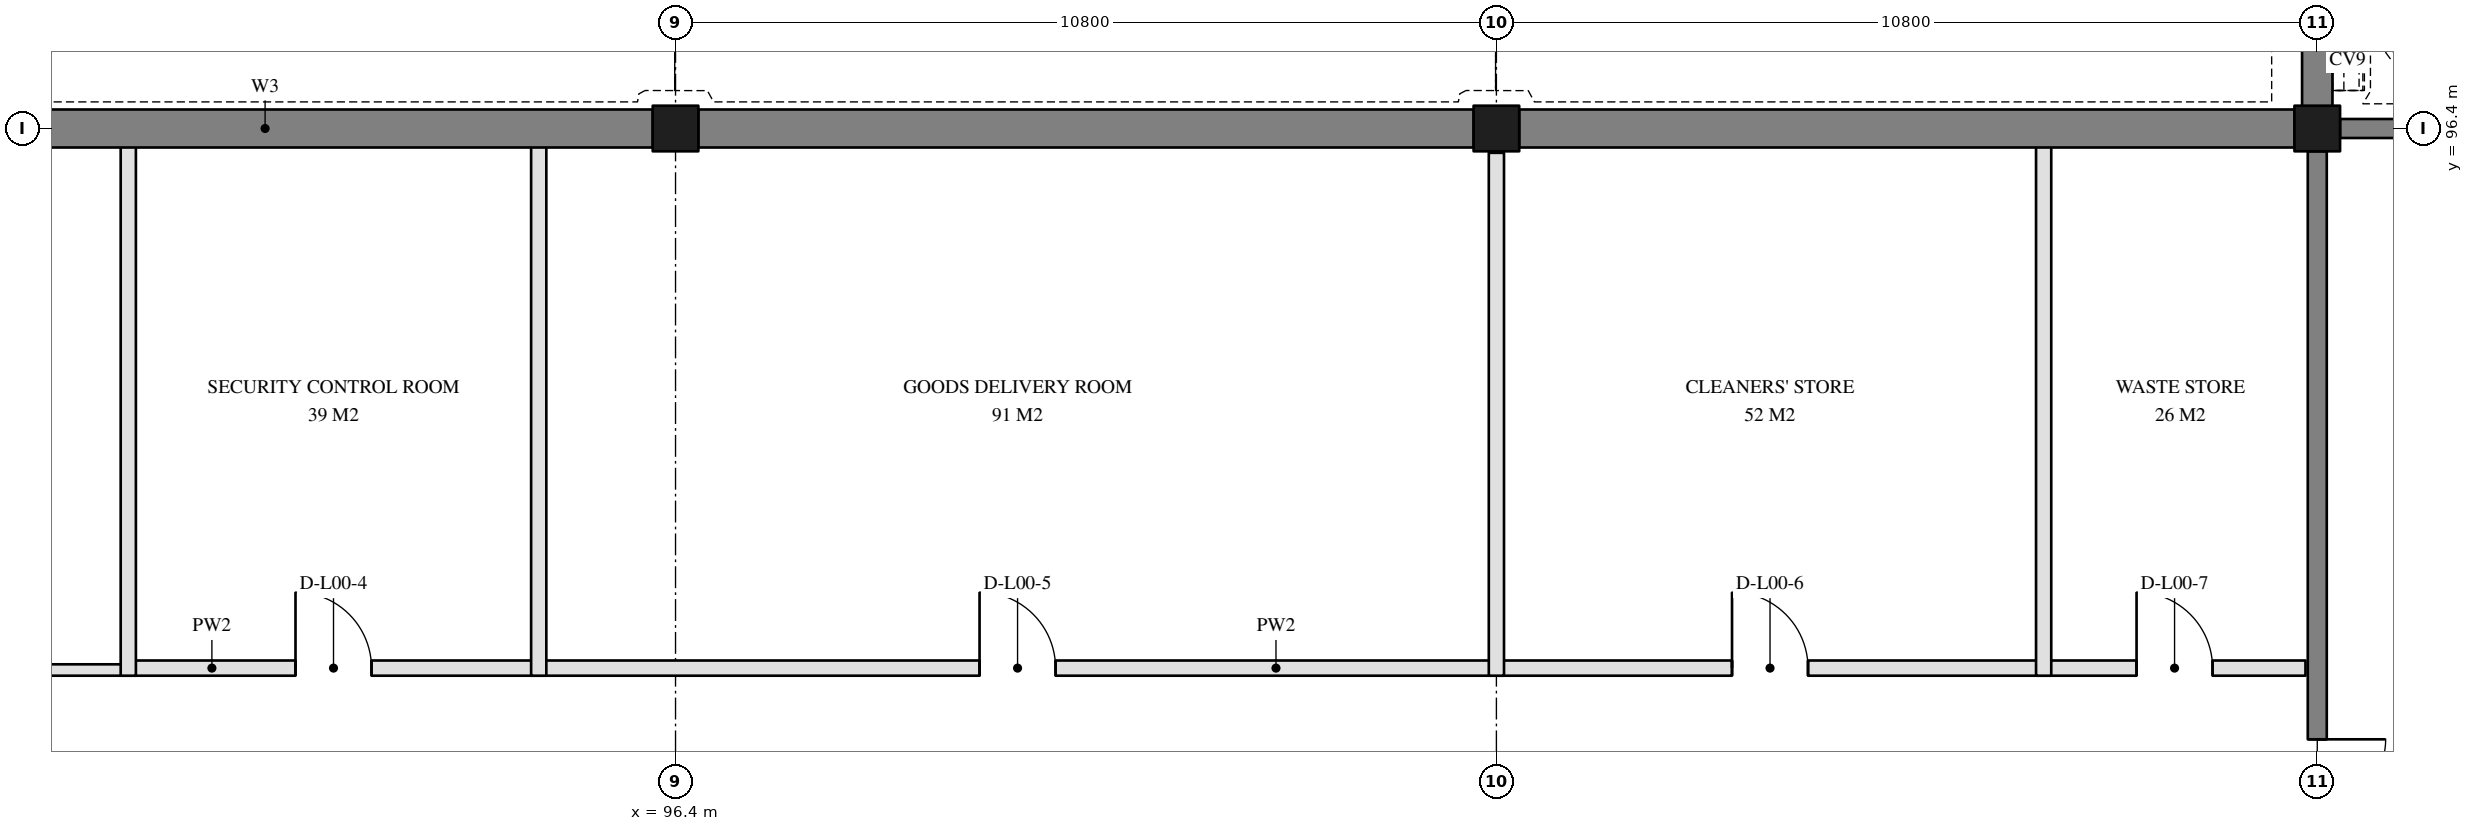
"""IFC4 building model, lengths in metres.
Left out: names, types, materials, properties, quantities, classifications, styles, units other than length and angle.
Written with IfcOpenShell. Run it as: python <this file> out.ifc"""

import sys

from ifc_helpers import new_model, si_unit, direction, frame, frame_2d, origin, origin_2d, place, context, subcontext, project, spatial, rectangle, extrude, element, fill, save


model = new_model("IFC4")
c1 = context("Model", 3, precision=1e-05, world=origin(), true_north=direction((0.0, 1.0)))
c2 = subcontext(c1, "Body", "Model", "MODEL_VIEW")
j1 = project(units=[si_unit("LENGTHUNIT", "METRE"), si_unit("PLANEANGLEUNIT", "RADIAN")], contexts=[c1])
p1 = place(None, origin())
s1 = spatial("IfcSite", under=j1, at=p1, CompositionType="ELEMENT")
p2 = place(p1, origin())
s2 = spatial("IfcBuilding", under=s1, at=p2, CompositionType="ELEMENT")
p3 = place(p2, origin())
s3 = spatial("IfcBuildingStorey", under=s2, at=p3, CompositionType="ELEMENT", Elevation=0.0)
for number, where, z_axis, x_axis in (
    (1, (96.4, 96.4, -1.8), (0.0, 0.0, 1.0), (1.0, 0.0, 0.0)),
    (2, (107.2, 96.4, -1.8), (0.0, 0.0, 1.0), (1.0, 0.0, 0.0)),
    (3, (118.0, 96.4, -1.8), (0.0, 0.0, 1.0), (1.0, 0.0, 0.0)),
):
    element("IfcColumn", number, at=place(p3, frame(where, z_axis=z_axis, x_axis=x_axis)), inside=s3, PredefinedType="COLUMN", context=c2, shape_type="SweptSolid", body=[
        extrude(rectangle(XDim=0.6, YDim=0.6, at=origin_2d()), origin(), (0.0, 0.0, 1.0), 6.6),
    ])
p4 = place(p3, frame((128.5, 96.4, 0.0), z_axis=(0.0, 0.0, 1.0), x_axis=(-1.0, 0.0, 0.0)))
e4 = element("IfcWall", 4, at=p4, inside=s3, PredefinedType="SOLIDWALL", context=c2, shape_type="SweptSolid", body=[
    extrude(rectangle(XDim=10.2, YDim=0.25, at=frame_2d((5.1, 0.0))), origin(), (0.0, 0.0, 1.0), 4.8),
])
p5 = place(p3, frame((118.0, 96.1, 0.0), z_axis=(0.0, 0.0, 1.0), x_axis=(0.0, -1.0, 0.0)))
e5 = element("IfcWall", 5, at=p5, inside=s3, PredefinedType="SOLIDWALL", context=c2, shape_type="SweptSolid", body=[
    extrude(rectangle(XDim=10.17, YDim=0.25, at=frame_2d((5.085, 0.0))), origin(), (0.0, 0.0, 1.0), 4.8),
])
p6 = place(p5, frame((7.737, 0.0, 0.0)))
e6 = element("IfcOpeningElement", 6, at=p6, cuts=e5, PredefinedType="OPENING", context=c2, shape_type="SweptSolid", body=[
    extrude(rectangle(XDim=1.8, YDim=2.1, at=frame_2d((0.9, 1.05))), frame((0.0, 0.135, 0.0), z_axis=(0.0, -1.0, 0.0), x_axis=(1.0, 0.0, 0.0)), (0.0, 0.0, 1.0), 0.27),
])
p7 = place(p3, frame((118.0, 96.6, 0.0), z_axis=(0.0, 0.0, 1.0), x_axis=(0.0, 1.0, 0.0)))
e7 = element("IfcWall", 7, at=p7, inside=s3, PredefinedType="SOLIDWALL", context=c2, shape_type="SweptSolid", body=[
    extrude(rectangle(XDim=21.2, YDim=0.4, at=frame_2d((10.6, 0.0))), origin(), (0.0, 0.0, 1.0), 4.4),
])
p8 = place(p3, frame((85.9, 96.4, 0.0), z_axis=(0.0, 0.0, 1.0), x_axis=(1.0, 0.0, 0.0)))
e8 = element("IfcWall", 8, at=p8, inside=s3, PredefinedType="SOLIDWALL", context=c2, shape_type="SweptSolid", body=[
    extrude(rectangle(XDim=10.2, YDim=0.5, at=frame_2d((5.1, 0.0))), origin(), (0.0, 0.0, 1.0), 3.5),
])
for number, where, z_axis, x_axis in (
    (9, (96.7, 96.4, 0.0), (0.0, 0.0, 1.0), (1.0, 0.0, 0.0)),
    (10, (107.5, 96.4, 0.0), (0.0, 0.0, 1.0), (1.0, 0.0, 0.0)),
):
    element("IfcWall", number, at=place(p3, frame(where, z_axis=z_axis, x_axis=x_axis)), inside=s3, PredefinedType="SOLIDWALL", context=c2, shape_type="SweptSolid", body=[
        extrude(rectangle(XDim=10.2, YDim=0.5, at=frame_2d((5.1, 0.0))), origin(), (0.0, 0.0, 1.0), 3.5),
    ])
p9 = place(p3, frame((114.4, 89.3, 0.0), z_axis=(0.0, 0.0, 1.0), x_axis=(1.0, 0.0, 0.0)))
e11 = element("IfcWall", 11, at=p9, inside=s3, PredefinedType="PARTITIONING", context=c2, shape_type="SweptSolid", body=[
    extrude(rectangle(XDim=3.445, YDim=0.2, at=frame_2d((1.723, 0.0))), origin(), (0.0, 0.0, 1.0), 4.4),
])
p10 = place(p9, frame((1.222, 0.0, 0.0)))
e12 = element("IfcOpeningElement", 12, at=p10, cuts=e11, PredefinedType="OPENING", context=c2, shape_type="SweptSolid", body=[
    extrude(rectangle(XDim=1.0, YDim=2.1, at=frame_2d((0.5, 1.05))), frame((0.0, 0.11, 0.0), z_axis=(0.0, -1.0, 0.0), x_axis=(1.0, 0.0, 0.0)), (0.0, 0.0, 1.0), 0.22),
])
p11 = place(p3, frame((89.2, 89.3, 0.0), z_axis=(0.0, 0.0, 1.0), x_axis=(1.0, 0.0, 0.0)))
e13 = element("IfcWall", 13, at=p11, inside=s3, PredefinedType="PARTITIONING", context=c2, shape_type="SweptSolid", body=[
    extrude(rectangle(XDim=5.4, YDim=0.2, at=frame_2d((2.7, 0.0))), origin(), (0.0, 0.0, 1.0), 4.4),
])
p12 = place(p11, frame((2.2, 0.0, 0.0)))
e14 = element("IfcOpeningElement", 14, at=p12, cuts=e13, PredefinedType="OPENING", context=c2, shape_type="SweptSolid", body=[
    extrude(rectangle(XDim=1.0, YDim=2.1, at=frame_2d((0.5, 1.05))), frame((0.0, 0.11, 0.0), z_axis=(0.0, -1.0, 0.0), x_axis=(1.0, 0.0, 0.0)), (0.0, 0.0, 1.0), 0.22),
])
p13 = place(p3, frame((94.6, 89.3, 0.0), z_axis=(0.0, 0.0, 1.0), x_axis=(1.0, 0.0, 0.0)))
e15 = element("IfcWall", 15, at=p13, inside=s3, PredefinedType="PARTITIONING", context=c2, shape_type="SweptSolid", body=[
    extrude(rectangle(XDim=12.6, YDim=0.2, at=frame_2d((6.3, 0.0))), origin(), (0.0, 0.0, 1.0), 3.5),
])
p14 = place(p13, frame((5.8, 0.0, 0.0)))
e16 = element("IfcOpeningElement", 16, at=p14, cuts=e15, PredefinedType="OPENING", context=c2, shape_type="SweptSolid", body=[
    extrude(rectangle(XDim=1.0, YDim=2.1, at=frame_2d((0.5, 1.05))), frame((0.0, 0.11, 0.0), z_axis=(0.0, -1.0, 0.0), x_axis=(1.0, 0.0, 0.0)), (0.0, 0.0, 1.0), 0.22),
])
p15 = place(p3, frame((107.2, 89.3, 0.0), z_axis=(0.0, 0.0, 1.0), x_axis=(1.0, 0.0, 0.0)))
e17 = element("IfcWall", 17, at=p15, inside=s3, PredefinedType="PARTITIONING", context=c2, shape_type="SweptSolid", body=[
    extrude(rectangle(XDim=7.2, YDim=0.2, at=frame_2d((3.6, 0.0))), origin(), (0.0, 0.0, 1.0), 3.5),
])
p16 = place(p15, frame((3.1, 0.0, 0.0)))
e18 = element("IfcOpeningElement", 18, at=p16, cuts=e17, PredefinedType="OPENING", context=c2, shape_type="SweptSolid", body=[
    extrude(rectangle(XDim=1.0, YDim=2.1, at=frame_2d((0.5, 1.05))), frame((0.0, 0.11, 0.0), z_axis=(0.0, -1.0, 0.0), x_axis=(1.0, 0.0, 0.0)), (0.0, 0.0, 1.0), 0.22),
])
p17 = place(p3, frame((73.0, 89.275, 0.0), z_axis=(0.0, 0.0, 1.0), x_axis=(1.0, 0.0, 0.0)))
e19 = element("IfcWall", 19, at=p17, inside=s3, PredefinedType="PARTITIONING", context=c2, shape_type="SweptSolid", body=[
    extrude(rectangle(XDim=16.2, YDim=0.15, at=frame_2d((8.1, 0.0))), origin(), (0.0, 0.0, 1.0), 3.5),
])
p18 = place(p17, frame((7.2, 0.0, 0.0)))
e20 = element("IfcOpeningElement", 20, at=p18, cuts=e19, PredefinedType="OPENING", context=c2, shape_type="SweptSolid", body=[
    extrude(rectangle(XDim=1.8, YDim=2.1, at=frame_2d((0.9, 1.05))), frame((0.0, 0.085, 0.0), z_axis=(0.0, -1.0, 0.0), x_axis=(1.0, 0.0, 0.0)), (0.0, 0.0, 1.0), 0.17),
])
for number, where, z_axis, x_axis in (
    (21, (89.2, 89.2, 0.0), (0.0, 0.0, 1.0), (0.0, 1.0, 0.0)),
    (22, (94.6, 89.2, 0.0), (0.0, 0.0, 1.0), (0.0, 1.0, 0.0)),
):
    element("IfcWall", number, at=place(p3, frame(where, z_axis=z_axis, x_axis=x_axis)), inside=s3, PredefinedType="PARTITIONING", context=c2, shape_type="SweptSolid", body=[
        extrude(rectangle(XDim=7.2, YDim=0.2, at=frame_2d((3.6, 0.0))), origin(), (0.0, 0.0, 1.0), 3.5),
    ])
p19 = place(p3, frame((107.2, 89.2, 0.0), z_axis=(0.0, 0.0, 1.0), x_axis=(0.0, 1.0, 0.0)))
e23 = element("IfcWall", 23, at=p19, inside=s3, PredefinedType="PARTITIONING", context=c2, shape_type="SweptSolid", body=[
    extrude(rectangle(XDim=6.88, YDim=0.2, at=frame_2d((3.44, 0.0))), origin(), (0.0, 0.0, 1.0), 3.5),
])
p20 = place(p3, frame((114.4, 89.2, 0.0), z_axis=(0.0, 0.0, 1.0), x_axis=(0.0, 1.0, 0.0)))
e24 = element("IfcWall", 24, at=p20, inside=s3, PredefinedType="PARTITIONING", context=c2, shape_type="SweptSolid", body=[
    extrude(rectangle(XDim=7.2, YDim=0.2, at=frame_2d((3.6, 0.0))), origin(), (0.0, 0.0, 1.0), 3.5),
])
p21 = place(p6, frame((1.8, 0.0, 0.0), z_axis=(0.0, 0.0, 1.0), x_axis=(-1.0, 0.0, 0.0)))
e25 = element("IfcDoor", 25, at=p21, inside=s3, OperationType="DOUBLE_DOOR_DOUBLE_SWING", PredefinedType="DOOR", context=c2, shape_type="SweptSolid", body=[
    extrude(rectangle(XDim=1.8, YDim=2.1, at=frame_2d((0.9, 1.05))), frame((0.0, 0.025, 0.0), z_axis=(0.0, -1.0, 0.0), x_axis=(1.0, 0.0, 0.0)), (0.0, 0.0, 1.0), 0.05),
])
fill(e6, e25)
p22 = place(p12, origin())
e26 = element("IfcDoor", 26, at=p22, inside=s3, OperationType="SINGLE_SWING_RIGHT", PredefinedType="DOOR", context=c2, shape_type="SweptSolid", body=[
    extrude(rectangle(XDim=1.0, YDim=2.1, at=frame_2d((0.5, 1.05))), frame((0.0, 0.025, 0.0), z_axis=(0.0, -1.0, 0.0), x_axis=(1.0, 0.0, 0.0)), (0.0, 0.0, 1.0), 0.05),
])
fill(e14, e26)
p23 = place(p14, origin())
e27 = element("IfcDoor", 27, at=p23, inside=s3, OperationType="SINGLE_SWING_RIGHT", PredefinedType="DOOR", context=c2, shape_type="SweptSolid", body=[
    extrude(rectangle(XDim=1.0, YDim=2.1, at=frame_2d((0.5, 1.05))), frame((0.0, 0.025, 0.0), z_axis=(0.0, -1.0, 0.0), x_axis=(1.0, 0.0, 0.0)), (0.0, 0.0, 1.0), 0.05),
])
fill(e16, e27)
p24 = place(p16, origin())
e28 = element("IfcDoor", 28, at=p24, inside=s3, OperationType="SINGLE_SWING_RIGHT", PredefinedType="DOOR", context=c2, shape_type="SweptSolid", body=[
    extrude(rectangle(XDim=1.0, YDim=2.1, at=frame_2d((0.5, 1.05))), frame((0.0, 0.025, 0.0), z_axis=(0.0, -1.0, 0.0), x_axis=(1.0, 0.0, 0.0)), (0.0, 0.0, 1.0), 0.05),
])
fill(e18, e28)
p25 = place(p10, origin())
e29 = element("IfcDoor", 29, at=p25, inside=s3, OperationType="SINGLE_SWING_LEFT", PredefinedType="DOOR", context=c2, shape_type="SweptSolid", body=[
    extrude(rectangle(XDim=1.0, YDim=2.1, at=frame_2d((0.5, 1.05))), frame((0.0, 0.025, 0.0), z_axis=(0.0, -1.0, 0.0), x_axis=(1.0, 0.0, 0.0)), (0.0, 0.0, 1.0), 0.05),
])
fill(e12, e29)
save(model, sys.argv[1])
